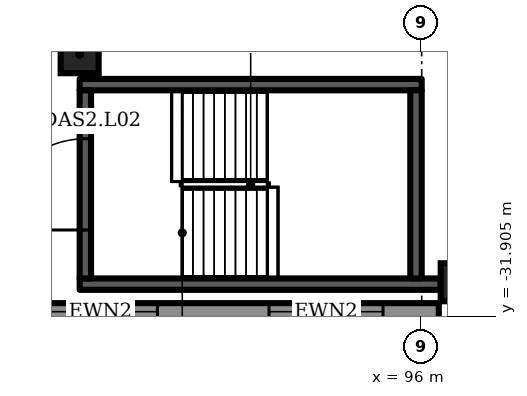
"""IFC4 building model, lengths in metres.
Left out: names, types, materials, properties, quantities, classifications, styles, units other than length and angle.
Written with IfcOpenShell. Run it as: python <this file> out.ifc"""

import sys

from ifc_helpers import new_model, si_unit, direction, frame, frame_2d, origin, origin_2d, place, context, subcontext, project, spatial, rectangle, extrude, element, fill, save


model = new_model("IFC4")
c1 = context("Model", 3, precision=1e-05, world=origin(), true_north=direction((0.0, 1.0)))
c2 = subcontext(c1, "Body", "Model", "MODEL_VIEW")
j1 = project(units=[si_unit("LENGTHUNIT", "METRE"), si_unit("PLANEANGLEUNIT", "RADIAN")], contexts=[c1])
p1 = place(None, origin())
s1 = spatial("IfcSite", under=j1, at=p1, CompositionType="ELEMENT")
p2 = place(p1, origin())
s2 = spatial("IfcBuilding", under=s1, at=p2, CompositionType="ELEMENT")
p3 = place(p2, frame((0.0, 0.0, 15.0)))
s3 = spatial("IfcBuildingStorey", under=s2, at=p3, CompositionType="ELEMENT", Elevation=15.0)
for number, where, z_axis, x_axis in (
    (1, (97.0, -31.0, 0.0), (0.0, 0.0, 1.0), (1.0, 0.0, 0.0)),
    (2, (87.0, -25.0, 0.0), (0.0, 0.0, 1.0), (1.0, 0.0, 0.0)),
):
    element("IfcColumn", number, at=place(p3, frame(where, z_axis=z_axis, x_axis=x_axis)), inside=s3, PredefinedType="COLUMN", context=c2, shape_type="SweptSolid", body=[
        extrude(rectangle(XDim=1.0, YDim=1.0, at=origin_2d()), origin(), (0.0, 0.0, 1.0), 6.5),
    ])
p4 = place(p3, frame((-4.45, -31.775, 0.0), z_axis=(0.0, 0.0, 1.0), x_axis=(1.0, 0.0, 0.0)))
e3 = element("IfcWall", 3, at=p4, inside=s3, PredefinedType="SOLIDWALL", context=c2, shape_type="SweptSolid", body=[
    extrude(rectangle(XDim=100.9, YDim=0.45, at=frame_2d((50.45, 0.0))), origin(), (0.0, 0.0, 1.0), 6.2),
])
p5 = place(p4, frame((1.468, 0.0, 1.0)))
e4 = element("IfcOpeningElement", 4, at=p5, cuts=e3, PredefinedType="OPENING", context=c2, shape_type="SweptSolid", body=[
    extrude(rectangle(XDim=3.0, YDim=4.2, at=frame_2d((1.5, 2.1))), frame((0.0, 0.235, 0.0), z_axis=(0.0, -1.0, 0.0), x_axis=(1.0, 0.0, 0.0)), (0.0, 0.0, 1.0), 0.47),
])
p6 = place(p4, frame((7.403, 0.0, 1.0)))
e5 = element("IfcOpeningElement", 5, at=p6, cuts=e3, PredefinedType="OPENING", context=c2, shape_type="SweptSolid", body=[
    extrude(rectangle(XDim=3.0, YDim=4.2, at=frame_2d((1.5, 2.1))), frame((0.0, 0.235, 0.0), z_axis=(0.0, -1.0, 0.0), x_axis=(1.0, 0.0, 0.0)), (0.0, 0.0, 1.0), 0.47),
])
p7 = place(p4, frame((13.338, 0.0, 1.0)))
e6 = element("IfcOpeningElement", 6, at=p7, cuts=e3, PredefinedType="OPENING", context=c2, shape_type="SweptSolid", body=[
    extrude(rectangle(XDim=3.0, YDim=4.2, at=frame_2d((1.5, 2.1))), frame((0.0, 0.235, 0.0), z_axis=(0.0, -1.0, 0.0), x_axis=(1.0, 0.0, 0.0)), (0.0, 0.0, 1.0), 0.47),
])
p8 = place(p4, frame((19.273, 0.0, 1.0)))
e7 = element("IfcOpeningElement", 7, at=p8, cuts=e3, PredefinedType="OPENING", context=c2, shape_type="SweptSolid", body=[
    extrude(rectangle(XDim=3.0, YDim=4.2, at=frame_2d((1.5, 2.1))), frame((0.0, 0.235, 0.0), z_axis=(0.0, -1.0, 0.0), x_axis=(1.0, 0.0, 0.0)), (0.0, 0.0, 1.0), 0.47),
])
p9 = place(p4, frame((25.209, 0.0, 1.0)))
e8 = element("IfcOpeningElement", 8, at=p9, cuts=e3, PredefinedType="OPENING", context=c2, shape_type="SweptSolid", body=[
    extrude(rectangle(XDim=3.0, YDim=4.2, at=frame_2d((1.5, 2.1))), frame((0.0, 0.235, 0.0), z_axis=(0.0, -1.0, 0.0), x_axis=(1.0, 0.0, 0.0)), (0.0, 0.0, 1.0), 0.47),
])
p10 = place(p4, frame((31.144, 0.0, 1.0)))
e9 = element("IfcOpeningElement", 9, at=p10, cuts=e3, PredefinedType="OPENING", context=c2, shape_type="SweptSolid", body=[
    extrude(rectangle(XDim=3.0, YDim=4.2, at=frame_2d((1.5, 2.1))), frame((0.0, 0.235, 0.0), z_axis=(0.0, -1.0, 0.0), x_axis=(1.0, 0.0, 0.0)), (0.0, 0.0, 1.0), 0.47),
])
p11 = place(p4, frame((37.079, 0.0, 1.0)))
e10 = element("IfcOpeningElement", 10, at=p11, cuts=e3, PredefinedType="OPENING", context=c2, shape_type="SweptSolid", body=[
    extrude(rectangle(XDim=3.0, YDim=4.2, at=frame_2d((1.5, 2.1))), frame((0.0, 0.235, 0.0), z_axis=(0.0, -1.0, 0.0), x_axis=(1.0, 0.0, 0.0)), (0.0, 0.0, 1.0), 0.47),
])
p12 = place(p4, frame((43.015, 0.0, 1.0)))
e11 = element("IfcOpeningElement", 11, at=p12, cuts=e3, PredefinedType="OPENING", context=c2, shape_type="SweptSolid", body=[
    extrude(rectangle(XDim=3.0, YDim=4.2, at=frame_2d((1.5, 2.1))), frame((0.0, 0.235, 0.0), z_axis=(0.0, -1.0, 0.0), x_axis=(1.0, 0.0, 0.0)), (0.0, 0.0, 1.0), 0.47),
])
p13 = place(p4, frame((48.95, 0.0, 1.0)))
e12 = element("IfcOpeningElement", 12, at=p13, cuts=e3, PredefinedType="OPENING", context=c2, shape_type="SweptSolid", body=[
    extrude(rectangle(XDim=3.0, YDim=4.2, at=frame_2d((1.5, 2.1))), frame((0.0, 0.235, 0.0), z_axis=(0.0, -1.0, 0.0), x_axis=(1.0, 0.0, 0.0)), (0.0, 0.0, 1.0), 0.47),
])
p14 = place(p4, frame((54.885, 0.0, 1.0)))
e13 = element("IfcOpeningElement", 13, at=p14, cuts=e3, PredefinedType="OPENING", context=c2, shape_type="SweptSolid", body=[
    extrude(rectangle(XDim=3.0, YDim=4.2, at=frame_2d((1.5, 2.1))), frame((0.0, 0.235, 0.0), z_axis=(0.0, -1.0, 0.0), x_axis=(1.0, 0.0, 0.0)), (0.0, 0.0, 1.0), 0.47),
])
p15 = place(p4, frame((60.821, 0.0, 1.0)))
e14 = element("IfcOpeningElement", 14, at=p15, cuts=e3, PredefinedType="OPENING", context=c2, shape_type="SweptSolid", body=[
    extrude(rectangle(XDim=3.0, YDim=4.2, at=frame_2d((1.5, 2.1))), frame((0.0, 0.235, 0.0), z_axis=(0.0, -1.0, 0.0), x_axis=(1.0, 0.0, 0.0)), (0.0, 0.0, 1.0), 0.47),
])
p16 = place(p4, frame((66.756, 0.0, 1.0)))
e15 = element("IfcOpeningElement", 15, at=p16, cuts=e3, PredefinedType="OPENING", context=c2, shape_type="SweptSolid", body=[
    extrude(rectangle(XDim=3.0, YDim=4.2, at=frame_2d((1.5, 2.1))), frame((0.0, 0.235, 0.0), z_axis=(0.0, -1.0, 0.0), x_axis=(1.0, 0.0, 0.0)), (0.0, 0.0, 1.0), 0.47),
])
p17 = place(p4, frame((72.691, 0.0, 1.0)))
e16 = element("IfcOpeningElement", 16, at=p17, cuts=e3, PredefinedType="OPENING", context=c2, shape_type="SweptSolid", body=[
    extrude(rectangle(XDim=3.0, YDim=4.2, at=frame_2d((1.5, 2.1))), frame((0.0, 0.235, 0.0), z_axis=(0.0, -1.0, 0.0), x_axis=(1.0, 0.0, 0.0)), (0.0, 0.0, 1.0), 0.47),
])
p18 = place(p4, frame((78.626, 0.0, 1.0)))
e17 = element("IfcOpeningElement", 17, at=p18, cuts=e3, PredefinedType="OPENING", context=c2, shape_type="SweptSolid", body=[
    extrude(rectangle(XDim=3.0, YDim=4.2, at=frame_2d((1.5, 2.1))), frame((0.0, 0.235, 0.0), z_axis=(0.0, -1.0, 0.0), x_axis=(1.0, 0.0, 0.0)), (0.0, 0.0, 1.0), 0.47),
])
p19 = place(p4, frame((84.562, 0.0, 1.0)))
e18 = element("IfcOpeningElement", 18, at=p19, cuts=e3, PredefinedType="OPENING", context=c2, shape_type="SweptSolid", body=[
    extrude(rectangle(XDim=3.0, YDim=4.2, at=frame_2d((1.5, 2.1))), frame((0.0, 0.235, 0.0), z_axis=(0.0, -1.0, 0.0), x_axis=(1.0, 0.0, 0.0)), (0.0, 0.0, 1.0), 0.47),
])
p20 = place(p4, frame((90.497, 0.0, 1.0)))
e19 = element("IfcOpeningElement", 19, at=p20, cuts=e3, PredefinedType="OPENING", context=c2, shape_type="SweptSolid", body=[
    extrude(rectangle(XDim=3.0, YDim=4.2, at=frame_2d((1.5, 2.1))), frame((0.0, 0.235, 0.0), z_axis=(0.0, -1.0, 0.0), x_axis=(1.0, 0.0, 0.0)), (0.0, 0.0, 1.0), 0.47),
])
p21 = place(p4, frame((96.432, 0.0, 1.0)))
e20 = element("IfcOpeningElement", 20, at=p21, cuts=e3, PredefinedType="OPENING", context=c2, shape_type="SweptSolid", body=[
    extrude(rectangle(XDim=3.0, YDim=4.2, at=frame_2d((1.5, 2.1))), frame((0.0, 0.235, 0.0), z_axis=(0.0, -1.0, 0.0), x_axis=(1.0, 0.0, 0.0)), (0.0, 0.0, 1.0), 0.47),
])
p22 = place(p3, frame((87.0, -31.05, 0.0), z_axis=(0.0, 0.0, 1.0), x_axis=(1.0, 0.0, 0.0)))
e21 = element("IfcWall", 21, at=p22, inside=s3, PredefinedType="SHEAR", context=c2, shape_type="SweptSolid", body=[
    extrude(rectangle(XDim=9.5, YDim=0.3, at=frame_2d((4.75, 0.0))), origin(), (0.0, 0.0, 1.0), 6.2),
])
p23 = place(p3, frame((87.0, -25.8, 0.0), z_axis=(0.0, 0.0, 1.0), x_axis=(1.0, 0.0, 0.0)))
e22 = element("IfcWall", 22, at=p23, inside=s3, PredefinedType="SHEAR", context=c2, shape_type="SweptSolid", body=[
    extrude(rectangle(XDim=9.0, YDim=0.3, at=frame_2d((4.5, 0.0))), origin(), (0.0, 0.0, 1.0), 6.2),
])
p24 = place(p3, frame((87.15, -30.9, 0.0), z_axis=(0.0, 0.0, 1.0), x_axis=(0.0, 1.0, 0.0)))
e23 = element("IfcWall", 23, at=p24, inside=s3, PredefinedType="SHEAR", context=c2, shape_type="SweptSolid", body=[
    extrude(rectangle(XDim=4.95, YDim=0.3, at=frame_2d((2.475, 0.0))), origin(), (0.0, 0.0, 1.0), 6.2),
])
p25 = place(p24, frame((1.275, 0.0, 0.0)))
e24 = element("IfcOpeningElement", 24, at=p25, cuts=e23, PredefinedType="OPENING", context=c2, shape_type="SweptSolid", body=[
    extrude(rectangle(XDim=2.4, YDim=2.1, at=frame_2d((1.2, 1.05))), frame((0.0, 0.16, 0.0), z_axis=(0.0, -1.0, 0.0), x_axis=(1.0, 0.0, 0.0)), (0.0, 0.0, 1.0), 0.32),
])
p26 = place(p3, frame((95.85, -30.9, 0.0), z_axis=(0.0, 0.0, 1.0), x_axis=(0.0, 1.0, 0.0)))
e25 = element("IfcWall", 25, at=p26, inside=s3, PredefinedType="SHEAR", context=c2, shape_type="SweptSolid", body=[
    extrude(rectangle(XDim=4.95, YDim=0.3, at=frame_2d((2.475, 0.0))), origin(), (0.0, 0.0, 1.0), 6.2),
])
p27 = place(p20, origin())
e26 = element("IfcWindow", 26, at=p27, inside=s3, PartitioningType="SINGLE_PANEL", PredefinedType="WINDOW", context=c2, shape_type="SweptSolid", body=[
    extrude(rectangle(XDim=3.0, YDim=4.2, at=frame_2d((1.5, 2.1))), frame((0.0, 0.105, 0.0), z_axis=(0.0, -1.0, 0.0), x_axis=(1.0, 0.0, 0.0)), (0.0, 0.0, 1.0), 0.06),
])
fill(e19, e26)
p28 = place(p21, origin())
e27 = element("IfcWindow", 27, at=p28, inside=s3, PartitioningType="SINGLE_PANEL", PredefinedType="WINDOW", context=c2, shape_type="SweptSolid", body=[
    extrude(rectangle(XDim=3.0, YDim=4.2, at=frame_2d((1.5, 2.1))), frame((0.0, 0.105, 0.0), z_axis=(0.0, -1.0, 0.0), x_axis=(1.0, 0.0, 0.0)), (0.0, 0.0, 1.0), 0.06),
])
fill(e20, e27)
p29 = place(p25, origin())
e28 = element("IfcDoor", 28, at=p29, inside=s3, OperationType="DOUBLE_DOOR_SINGLE_SWING", PredefinedType="DOOR", context=c2, shape_type="SweptSolid", body=[
    extrude(rectangle(XDim=2.4, YDim=2.1, at=frame_2d((1.2, 1.05))), frame((0.0, 0.025, 0.0), z_axis=(0.0, -1.0, 0.0), x_axis=(1.0, 0.0, 0.0)), (0.0, 0.0, 1.0), 0.05),
])
fill(e24, e28)
save(model, sys.argv[1])
